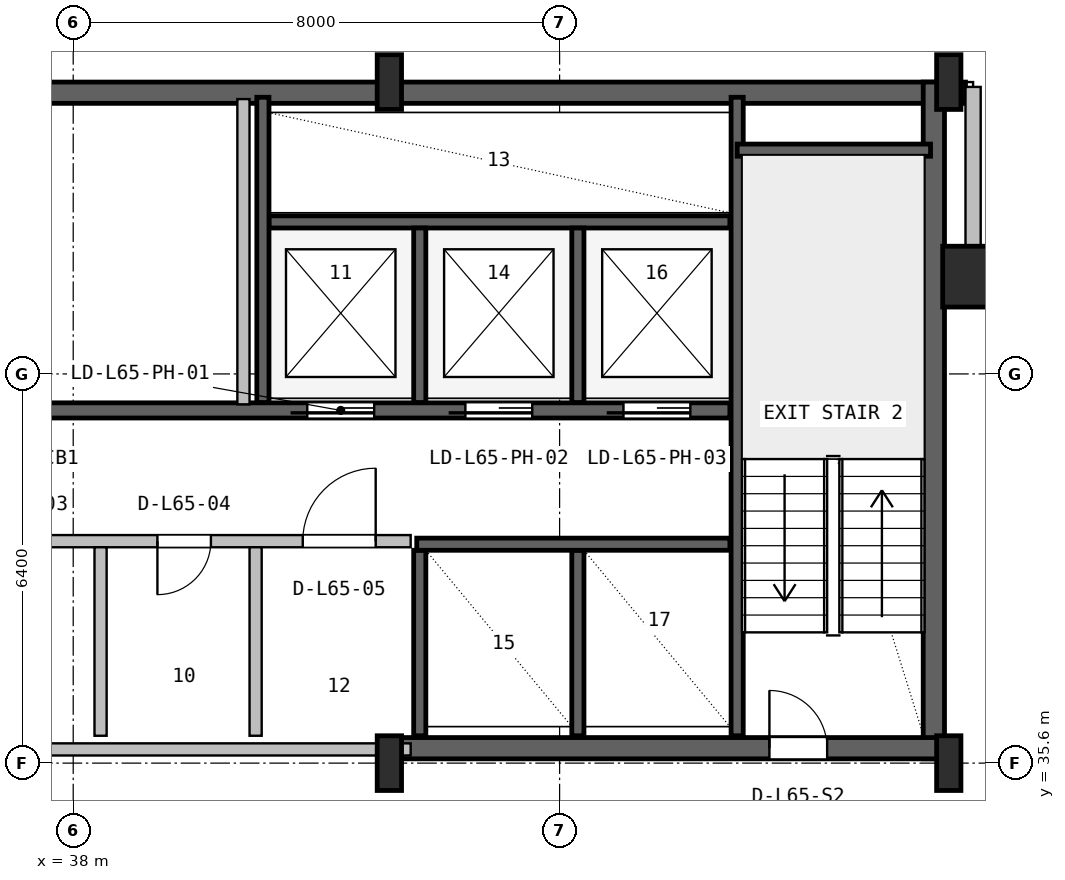
"""IFC4 building model, lengths in metres.
Left out: names, types, materials, properties, quantities, classifications, styles, units other than length and angle.
Written with IfcOpenShell. Run it as: python <this file> out.ifc"""

import sys

from ifc_helpers import new_model, si_unit, direction, frame, frame_2d, origin, origin_2d, place, context, subcontext, project, spatial, rectangle, hollow_rectangle, i_section, extrude, source, transform, mapped, element, fill, save


model = new_model("IFC4")
c1 = context("Model", 3, precision=1e-05, world=origin(), true_north=direction((0.0, 1.0)))
c2 = subcontext(c1, "Body", "Model", "MODEL_VIEW")
j1 = project(units=[si_unit("LENGTHUNIT", "METRE"), si_unit("PLANEANGLEUNIT", "RADIAN")], contexts=[c1])
p1 = place(None, origin())
s1 = spatial("IfcSite", under=j1, at=p1, CompositionType="ELEMENT")
p2 = place(p1, origin())
s2 = spatial("IfcBuilding", under=s1, at=p2, CompositionType="ELEMENT")
p3 = place(p2, frame((0.0, 0.0, 262.2)))
s3 = spatial("IfcBuildingStorey", under=s2, at=p3, CompositionType="ELEMENT", Elevation=262.2)
p4 = place(p3, frame((15.325, 46.625, 0.0), z_axis=(0.0, 0.0, 1.0), x_axis=(1.0, 0.0, 0.0)))
e1 = element("IfcWall", 1, at=p4, inside=s3, PredefinedType="SHEAR", context=c2, shape_type="SweptSolid", body=[
    extrude(rectangle(XDim=37.35, YDim=0.35, at=frame_2d((18.675, 0.0))), origin(), (0.0, 0.0, 1.0), 3.55),
])
p5 = place(p3, frame((52.155, 35.67, 0.0), z_axis=(0.0, 0.0, 1.0), x_axis=(0.0, 1.0, 0.0)))
e2 = element("IfcWall", 2, at=p5, inside=s3, PredefinedType="SHEAR", context=c2, shape_type="SweptSolid", body=[
    extrude(rectangle(XDim=11.13, YDim=0.35, at=frame_2d((5.565, 0.0))), origin(), (0.0, 0.0, 1.0), 3.55),
])
p6 = place(p3, frame((43.2, 35.845, 0.0), z_axis=(0.0, 0.0, 1.0), x_axis=(1.0, 0.0, 0.0)))
e3 = element("IfcWall", 3, at=p6, inside=s3, PredefinedType="SHEAR", context=c2, shape_type="SweptSolid", body=[
    extrude(rectangle(XDim=9.13, YDim=0.35, at=frame_2d((4.565, 0.0))), origin(), (0.0, 0.0, 1.0), 3.55),
])
p7 = place(p6, frame((6.25, 0.0, 0.0)))
e4 = element("IfcOpeningElement", 4, at=p7, cuts=e3, PredefinedType="OPENING", context=c2, shape_type="SweptSolid", body=[
    extrude(rectangle(XDim=0.95, YDim=2.1, at=frame_2d((0.475, 1.05))), frame((0.0, 0.185, 0.0), z_axis=(0.0, -1.0, 0.0), x_axis=(1.0, 0.0, 0.0)), (0.0, 0.0, 1.0), 0.37),
])
m1 = source(origin(), c2, "Body", "SweptSolid", [
    extrude(i_section(OverallWidth=0.4, OverallDepth=0.9, WebThickness=0.016, FlangeThickness=0.028, FilletRadius=0.016, at=origin_2d()), origin(), (0.0, 0.0, 1.0), 3.8),
])
for number, where, z_axis, x_axis in (
    (5, (43.2, 35.6, 0.0), (0.0, 0.0, 1.0), (1.0, 0.0, 0.0)),
    (6, (43.2, 46.8, 0.0), (0.0, 0.0, 1.0), (1.0, 0.0, 0.0)),
    (7, (52.4, 35.6, 0.0), (0.0, 0.0, 1.0), (1.0, 0.0, 0.0)),
    (8, (52.4, 46.8, 0.0), (0.0, 0.0, 1.0), (1.0, 0.0, 0.0)),
):
    element("IfcColumn", number, at=place(p3, frame(where, z_axis=z_axis, x_axis=x_axis)), inside=s3, PredefinedType="COLUMN", context=c2, shape_type="MappedRepresentation", body=[
        mapped(m1, transform((0.0, 0.0, 0.0), x_axis=(1.0, 0.0, 0.0), y_axis=(0.0, 1.0, 0.0), z_axis=(0.0, 0.0, 1.0), scale=1.0)),
    ])
m2 = source(origin(), c2, "Body", "SweptSolid", [
    extrude(hollow_rectangle(XDim=1.0, YDim=1.0, WallThickness=0.04, at=origin_2d()), origin(), (0.0, 0.0, 1.0), 3.8),
])
p8 = place(p3, frame((52.8, 43.6, 0.0), z_axis=(0.0, 0.0, 1.0), x_axis=(1.0, 0.0, 0.0)))
e9 = element("IfcColumn", 9, at=p8, inside=s3, PredefinedType="COLUMN", context=c2, shape_type="MappedRepresentation", body=[
    mapped(m2, transform((0.0, 0.0, 0.0), x_axis=(1.0, 0.0, 0.0), y_axis=(0.0, 1.0, 0.0), z_axis=(0.0, 0.0, 1.0), scale=1.0)),
])
p9 = place(p3, frame((52.93, 43.6, 0.0), z_axis=(0.0, 0.0, 1.0), x_axis=(1.0, 0.0, 0.0)))
e10 = element("IfcWall", 10, at=p9, inside=s3, PredefinedType="SOLIDWALL", context=c2, shape_type="SweptSolid", body=[
    extrude(rectangle(XDim=2.99, YDim=0.25, at=frame_2d((1.495, 0.0))), origin(), (0.0, 0.0, 1.0), 3.53),
])
p10 = place(p3, frame((52.8, 43.52, 0.0), z_axis=(0.0, 0.0, 1.0), x_axis=(0.0, 1.0, 0.0)))
e11 = element("IfcWall", 11, at=p10, inside=s3, PredefinedType="SOLIDWALL", context=c2, shape_type="SweptSolid", body=[
    extrude(rectangle(XDim=3.2, YDim=0.25, at=frame_2d((1.6, 0.0))), origin(), (0.0, 0.0, 1.0), 3.171),
])
p11 = place(p3, frame((48.92, 36.05, 0.0), z_axis=(0.0, 0.0, 1.0), x_axis=(0.0, 1.0, 0.0)))
e12 = element("IfcWall", 12, at=p11, inside=s3, PredefinedType="SHEAR", context=c2, shape_type="SweptSolid", body=[
    extrude(rectangle(XDim=10.5, YDim=0.2, at=frame_2d((5.25, 0.0))), origin(), (0.0, 0.0, 1.0), 3.55),
])
p12 = place(p3, frame((48.92, 45.68, 0.0), z_axis=(0.0, 0.0, 1.0), x_axis=(1.0, 0.0, 0.0)))
e13 = element("IfcWall", 13, at=p12, inside=s3, PredefinedType="SHEAR", context=c2, shape_type="SweptSolid", body=[
    extrude(rectangle(XDim=3.18, YDim=0.2, at=frame_2d((1.59, 0.0))), origin(), (0.0, 0.0, 1.0), 3.55),
])
p13 = place(p3, frame((24.98, 41.4, 0.0), z_axis=(0.0, 0.0, 1.0), x_axis=(1.0, 0.0, 0.0)))
e14 = element("IfcWall", 14, at=p13, inside=s3, PredefinedType="SHEAR", context=c2, shape_type="SweptSolid", body=[
    extrude(rectangle(XDim=23.82, YDim=0.25, at=frame_2d((11.91, 0.0))), origin(), (0.0, 0.0, 1.0), 3.55),
])
p14 = place(p13, frame((16.87, 0.0, 0.0)))
e15 = element("IfcOpeningElement", 15, at=p14, cuts=e14, PredefinedType="OPENING", context=c2, shape_type="SweptSolid", body=[
    extrude(rectangle(XDim=1.1, YDim=2.18, at=frame_2d((0.55, 1.09))), frame((0.0, 0.135, 0.0), z_axis=(0.0, -1.0, 0.0), x_axis=(1.0, 0.0, 0.0)), (0.0, 0.0, 1.0), 0.27),
])
p15 = place(p13, frame((19.47, 0.0, 0.0)))
e16 = element("IfcOpeningElement", 16, at=p15, cuts=e14, PredefinedType="OPENING", context=c2, shape_type="SweptSolid", body=[
    extrude(rectangle(XDim=1.1, YDim=2.18, at=frame_2d((0.55, 1.09))), frame((0.0, 0.135, 0.0), z_axis=(0.0, -1.0, 0.0), x_axis=(1.0, 0.0, 0.0)), (0.0, 0.0, 1.0), 0.27),
])
p16 = place(p13, frame((22.07, 0.0, 0.0)))
e17 = element("IfcOpeningElement", 17, at=p16, cuts=e14, PredefinedType="OPENING", context=c2, shape_type="SweptSolid", body=[
    extrude(rectangle(XDim=1.1, YDim=2.18, at=frame_2d((0.55, 1.09))), frame((0.0, 0.135, 0.0), z_axis=(0.0, -1.0, 0.0), x_axis=(1.0, 0.0, 0.0)), (0.0, 0.0, 1.0), 0.27),
])
p17 = place(p13, frame((0.96, 0.0, 0.0)))
e18 = element("IfcOpeningElement", 18, at=p17, cuts=e14, PredefinedType="OPENING", context=c2, shape_type="SweptSolid", body=[
    extrude(rectangle(XDim=1.0, YDim=2.08, at=frame_2d((0.5, 1.04))), frame((0.0, 0.135, 0.0), z_axis=(0.0, -1.0, 0.0), x_axis=(1.0, 0.0, 0.0)), (0.0, 0.0, 1.0), 0.27),
])
p18 = place(p13, frame((3.56, 0.0, 0.0)))
e19 = element("IfcOpeningElement", 19, at=p18, cuts=e14, PredefinedType="OPENING", context=c2, shape_type="SweptSolid", body=[
    extrude(rectangle(XDim=1.0, YDim=2.08, at=frame_2d((0.5, 1.04))), frame((0.0, 0.135, 0.0), z_axis=(0.0, -1.0, 0.0), x_axis=(1.0, 0.0, 0.0)), (0.0, 0.0, 1.0), 0.27),
])
p19 = place(p13, frame((6.16, 0.0, 0.0)))
e20 = element("IfcOpeningElement", 20, at=p19, cuts=e14, PredefinedType="OPENING", context=c2, shape_type="SweptSolid", body=[
    extrude(rectangle(XDim=0.92, YDim=2.08, at=frame_2d((0.46, 1.04))), frame((0.0, 0.135, 0.0), z_axis=(0.0, -1.0, 0.0), x_axis=(1.0, 0.0, 0.0)), (0.0, 0.0, 1.0), 0.27),
])
p20 = place(p13, frame((11.56, 0.0, 0.0)))
e21 = element("IfcOpeningElement", 21, at=p20, cuts=e14, PredefinedType="OPENING", context=c2, shape_type="SweptSolid", body=[
    extrude(rectangle(XDim=1.0, YDim=2.08, at=frame_2d((0.5, 1.04))), frame((0.0, 0.135, 0.0), z_axis=(0.0, -1.0, 0.0), x_axis=(1.0, 0.0, 0.0)), (0.0, 0.0, 1.0), 0.27),
])
p21 = place(p3, frame((41.22, 44.5, 0.0), z_axis=(0.0, 0.0, 1.0), x_axis=(1.0, 0.0, 0.0)))
e22 = element("IfcWall", 22, at=p21, inside=s3, PredefinedType="SHEAR", context=c2, shape_type="SweptSolid", body=[
    extrude(rectangle(XDim=7.58, YDim=0.2, at=frame_2d((3.79, 0.0))), origin(), (0.0, 0.0, 1.0), 3.55),
])
p22 = place(p3, frame((41.12, 41.53, 0.0), z_axis=(0.0, 0.0, 1.0), x_axis=(0.0, 1.0, 0.0)))
e23 = element("IfcWall", 23, at=p22, inside=s3, PredefinedType="SHEAR", context=c2, shape_type="SweptSolid", body=[
    extrude(rectangle(XDim=5.02, YDim=0.2, at=frame_2d((2.51, 0.0))), origin(), (0.0, 0.0, 1.0), 3.55),
])
for number, where, z_axis, x_axis in (
    (24, (43.7, 41.53, 0.0), (0.0, 0.0, 1.0), (0.0, 1.0, 0.0)),
    (25, (46.3, 41.53, 0.0), (0.0, 0.0, 1.0), (0.0, 1.0, 0.0)),
):
    element("IfcWall", number, at=place(p3, frame(where, z_axis=z_axis, x_axis=x_axis)), inside=s3, PredefinedType="SHEAR", context=c2, shape_type="SweptSolid", body=[
        extrude(rectangle(XDim=2.87, YDim=0.2, at=frame_2d((1.435, 0.0))), origin(), (0.0, 0.0, 1.0), 3.55),
    ])
for number, where, z_axis, x_axis in (
    (26, (43.7, 36.05, 0.0), (0.0, 0.0, 1.0), (0.0, 1.0, 0.0)),
    (27, (46.3, 36.05, 0.0), (0.0, 0.0, 1.0), (0.0, 1.0, 0.0)),
):
    element("IfcWall", number, at=place(p3, frame(where, z_axis=z_axis, x_axis=x_axis)), inside=s3, PredefinedType="SHEAR", context=c2, shape_type="SweptSolid", body=[
        extrude(rectangle(XDim=3.05, YDim=0.2, at=frame_2d((1.525, 0.0))), origin(), (0.0, 0.0, 1.0), 3.55),
    ])
p23 = place(p3, frame((43.65, 39.2, 0.0), z_axis=(0.0, 0.0, 1.0), x_axis=(1.0, 0.0, 0.0)))
e28 = element("IfcWall", 28, at=p23, inside=s3, PredefinedType="SHEAR", context=c2, shape_type="SweptSolid", body=[
    extrude(rectangle(XDim=5.15, YDim=0.2, at=frame_2d((2.575, 0.0))), origin(), (0.0, 0.0, 1.0), 3.55),
])
p24 = place(p3, frame((29.85, 35.825, 0.0), z_axis=(0.0, 0.0, 1.0), x_axis=(1.0, 0.0, 0.0)))
e29 = element("IfcWall", 29, at=p24, inside=s3, PredefinedType="SOLIDWALL", context=c2, shape_type="SweptSolid", body=[
    extrude(rectangle(XDim=13.7, YDim=0.2, at=frame_2d((6.85, 0.0))), origin(), (0.0, 0.0, 1.0), 2.575),
])
p25 = place(p3, frame((29.85, 39.25, 0.0), z_axis=(0.0, 0.0, 1.0), x_axis=(1.0, 0.0, 0.0)))
e30 = element("IfcWall", 30, at=p25, inside=s3, PredefinedType="SOLIDWALL", context=c2, shape_type="SweptSolid", body=[
    extrude(rectangle(XDim=13.7, YDim=0.2, at=frame_2d((6.85, 0.0))), origin(), (0.0, 0.0, 1.0), 3.53),
])
p26 = place(p25, frame((1.05, 0.0, 0.0)))
e31 = element("IfcOpeningElement", 31, at=p26, cuts=e30, PredefinedType="OPENING", context=c2, shape_type="SweptSolid", body=[
    extrude(rectangle(XDim=0.9, YDim=2.06, at=frame_2d((0.45, 1.03))), frame((0.0, 0.11, 0.0), z_axis=(0.0, -1.0, 0.0), x_axis=(1.0, 0.0, 0.0)), (0.0, 0.0, 1.0), 0.22),
])
p27 = place(p25, frame((4.05, 0.0, 0.0)))
e32 = element("IfcOpeningElement", 32, at=p27, cuts=e30, PredefinedType="OPENING", context=c2, shape_type="SweptSolid", body=[
    extrude(rectangle(XDim=0.9, YDim=2.06, at=frame_2d((0.45, 1.03))), frame((0.0, 0.11, 0.0), z_axis=(0.0, -1.0, 0.0), x_axis=(1.0, 0.0, 0.0)), (0.0, 0.0, 1.0), 0.22),
])
p28 = place(p25, frame((6.85, 0.0, 0.0)))
e33 = element("IfcOpeningElement", 33, at=p28, cuts=e30, PredefinedType="OPENING", context=c2, shape_type="SweptSolid", body=[
    extrude(rectangle(XDim=0.9, YDim=2.06, at=frame_2d((0.45, 1.03))), frame((0.0, 0.11, 0.0), z_axis=(0.0, -1.0, 0.0), x_axis=(1.0, 0.0, 0.0)), (0.0, 0.0, 1.0), 0.22),
])
p29 = place(p25, frame((9.535, 0.0, 0.0)))
e34 = element("IfcOpeningElement", 34, at=p29, cuts=e30, PredefinedType="OPENING", context=c2, shape_type="SweptSolid", body=[
    extrude(rectangle(XDim=0.88, YDim=2.06, at=frame_2d((0.44, 1.03))), frame((0.0, 0.11, 0.0), z_axis=(0.0, -1.0, 0.0), x_axis=(1.0, 0.0, 0.0)), (0.0, 0.0, 1.0), 0.22),
])
p30 = place(p25, frame((11.925, 0.0, 0.0)))
e35 = element("IfcOpeningElement", 35, at=p30, cuts=e30, PredefinedType="OPENING", context=c2, shape_type="SweptSolid", body=[
    extrude(rectangle(XDim=1.2, YDim=2.1, at=frame_2d((0.6, 1.05))), frame((0.0, 0.11, 0.0), z_axis=(0.0, -1.0, 0.0), x_axis=(1.0, 0.0, 0.0)), (0.0, 0.0, 1.0), 0.22),
])
p31 = place(p3, frame((38.45, 36.05, 0.0), z_axis=(0.0, 0.0, 1.0), x_axis=(0.0, 1.0, 0.0)))
e36 = element("IfcWall", 36, at=p31, inside=s3, PredefinedType="PLUMBINGWALL", context=c2, shape_type="SweptSolid", body=[
    extrude(rectangle(XDim=3.1, YDim=0.2, at=frame_2d((1.55, 0.0))), origin(), (0.0, 0.0, 1.0), 3.53),
])
p32 = place(p3, frame((41.0, 36.05, 0.0), z_axis=(0.0, 0.0, 1.0), x_axis=(0.0, 1.0, 0.0)))
e37 = element("IfcWall", 37, at=p32, inside=s3, PredefinedType="SOLIDWALL", context=c2, shape_type="SweptSolid", body=[
    extrude(rectangle(XDim=3.1, YDim=0.2, at=frame_2d((1.55, 0.0))), origin(), (0.0, 0.0, 1.0), 3.53),
])
p33 = place(p3, frame((40.8, 41.5, 0.0), z_axis=(0.0, 0.0, 1.0), x_axis=(0.0, 1.0, 0.0)))
e38 = element("IfcWall", 38, at=p33, inside=s3, PredefinedType="SOLIDWALL", context=c2, shape_type="SweptSolid", body=[
    extrude(rectangle(XDim=5.02, YDim=0.2, at=frame_2d((2.51, 0.0))), origin(), (0.0, 0.0, 1.0), 3.53),
])
m3 = source(origin(), c2, "Body", "SweptSolid", [
    extrude(rectangle(XDim=0.95, YDim=2.1, at=frame_2d((0.475, 1.05))), frame((0.0, 0.025, 0.0), z_axis=(0.0, -1.0, 0.0), x_axis=(1.0, 0.0, 0.0)), (0.0, 0.0, 1.0), 0.05),
])
p34 = place(p7, origin())
e39 = element("IfcDoor", 39, at=p34, inside=s3, OperationType="SINGLE_SWING_LEFT", PredefinedType="DOOR", context=c2, shape_type="MappedRepresentation", body=[
    mapped(m3, transform((0.0, 0.0, 0.0), x_axis=(1.0, 0.0, 0.0), y_axis=(0.0, 1.0, 0.0), z_axis=(0.0, 0.0, 1.0), scale=1.0)),
])
fill(e4, e39)
m4 = source(origin(), c2, "Body", "SweptSolid", [
    extrude(rectangle(XDim=1.1, YDim=2.18, at=frame_2d((0.55, 1.09))), frame((0.0, 0.025, 0.0), z_axis=(0.0, -1.0, 0.0), x_axis=(1.0, 0.0, 0.0)), (0.0, 0.0, 1.0), 0.05),
])
p35 = place(p14, frame((1.1, 0.0, 0.0), z_axis=(0.0, 0.0, 1.0), x_axis=(-1.0, 0.0, 0.0)))
e40 = element("IfcDoor", 40, at=p35, inside=s3, OperationType="SLIDING_TO_LEFT", PredefinedType="DOOR", context=c2, shape_type="MappedRepresentation", body=[
    mapped(m4, transform((0.0, 0.0, 0.0), x_axis=(1.0, 0.0, 0.0), y_axis=(0.0, 1.0, 0.0), z_axis=(0.0, 0.0, 1.0), scale=1.0)),
])
fill(e15, e40)
p36 = place(p15, frame((1.1, 0.0, 0.0), z_axis=(0.0, 0.0, 1.0), x_axis=(-1.0, 0.0, 0.0)))
e41 = element("IfcDoor", 41, at=p36, inside=s3, OperationType="SLIDING_TO_LEFT", PredefinedType="DOOR", context=c2, shape_type="MappedRepresentation", body=[
    mapped(m4, transform((0.0, 0.0, 0.0), x_axis=(1.0, 0.0, 0.0), y_axis=(0.0, 1.0, 0.0), z_axis=(0.0, 0.0, 1.0), scale=1.0)),
])
fill(e16, e41)
p37 = place(p16, frame((1.1, 0.0, 0.0), z_axis=(0.0, 0.0, 1.0), x_axis=(-1.0, 0.0, 0.0)))
e42 = element("IfcDoor", 42, at=p37, inside=s3, OperationType="SLIDING_TO_LEFT", PredefinedType="DOOR", context=c2, shape_type="MappedRepresentation", body=[
    mapped(m4, transform((0.0, 0.0, 0.0), x_axis=(1.0, 0.0, 0.0), y_axis=(0.0, 1.0, 0.0), z_axis=(0.0, 0.0, 1.0), scale=1.0)),
])
fill(e17, e42)
m5 = source(origin(), c2, "Body", "SweptSolid", [
    extrude(rectangle(XDim=0.88, YDim=2.06, at=frame_2d((0.44, 1.03))), frame((0.0, 0.025, 0.0), z_axis=(0.0, -1.0, 0.0), x_axis=(1.0, 0.0, 0.0)), (0.0, 0.0, 1.0), 0.05),
])
p38 = place(p29, frame((0.88, 0.0, 0.0), z_axis=(0.0, 0.0, 1.0), x_axis=(-1.0, 0.0, 0.0)))
e43 = element("IfcDoor", 43, at=p38, inside=s3, OperationType="SINGLE_SWING_LEFT", PredefinedType="DOOR", context=c2, shape_type="MappedRepresentation", body=[
    mapped(m5, transform((0.0, 0.0, 0.0), x_axis=(1.0, 0.0, 0.0), y_axis=(0.0, 1.0, 0.0), z_axis=(0.0, 0.0, 1.0), scale=1.0)),
])
fill(e34, e43)
m6 = source(origin(), c2, "Body", "SweptSolid", [
    extrude(rectangle(XDim=1.2, YDim=2.1, at=frame_2d((0.6, 1.05))), frame((0.0, 0.025, 0.0), z_axis=(0.0, -1.0, 0.0), x_axis=(1.0, 0.0, 0.0)), (0.0, 0.0, 1.0), 0.05),
])
p39 = place(p30, origin())
e44 = element("IfcDoor", 44, at=p39, inside=s3, OperationType="SINGLE_SWING_RIGHT", PredefinedType="DOOR", context=c2, shape_type="MappedRepresentation", body=[
    mapped(m6, transform((0.0, 0.0, 0.0), x_axis=(1.0, 0.0, 0.0), y_axis=(0.0, 1.0, 0.0), z_axis=(0.0, 0.0, 1.0), scale=1.0)),
])
fill(e35, e44)
save(model, sys.argv[1])
